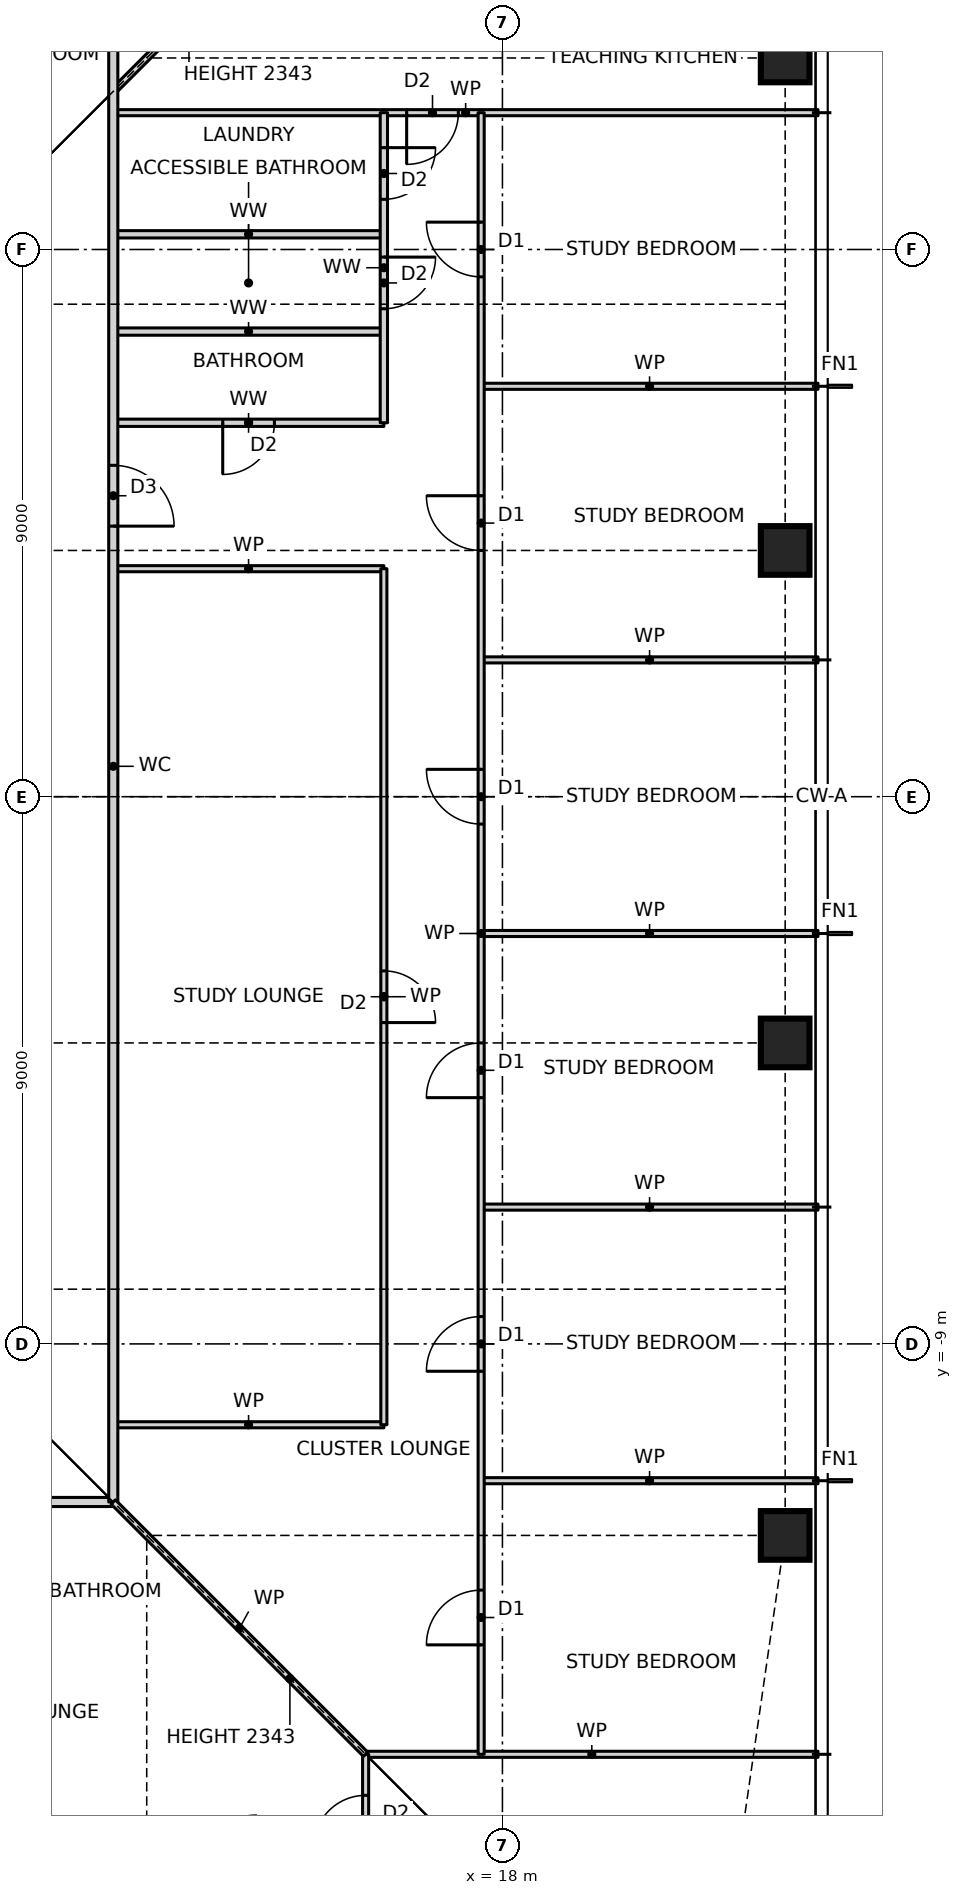
"""IFC4 building model, lengths in metres.
Left out: names, types, materials, properties, quantities, classifications, styles, units other than length and angle.
Written with IfcOpenShell. Run it as: python <this file> out.ifc"""

import sys

from ifc_helpers import new_model, si_unit, direction, frame, frame_2d, origin, origin_2d, place, context, subcontext, project, spatial, rectangle, hollow_rectangle, extrude, element, fill, save


model = new_model("IFC4")
c1 = context("Model", 3, precision=1e-05, world=origin(), true_north=direction((0.0, 1.0)))
c2 = subcontext(c1, "Body", "Model", "MODEL_VIEW")
j1 = project(units=[si_unit("LENGTHUNIT", "METRE"), si_unit("PLANEANGLEUNIT", "RADIAN")], contexts=[c1])
p1 = place(None, origin())
s1 = spatial("IfcSite", under=j1, at=p1, CompositionType="ELEMENT")
p2 = place(p1, origin())
s2 = spatial("IfcBuilding", under=s1, at=p2, CompositionType="ELEMENT")
p3 = place(p2, frame((0.0, 0.0, 60.5)))
s3 = spatial("IfcBuildingStorey", under=s2, at=p3, CompositionType="ELEMENT", Elevation=60.5)
for number, where, z_axis, x_axis in (
    (1, (22.65, -12.15, 0.0), (0.0, 0.0, 1.0), (1.0, 0.0, 0.0)),
    (2, (22.65, -4.05, 0.0), (0.0, 0.0, 1.0), (1.0, 0.0, 0.0)),
    (3, (22.65, 4.05, 0.0), (0.0, 0.0, 1.0), (1.0, 0.0, 0.0)),
    (4, (22.65, 12.15, 0.0), (0.0, 0.0, 1.0), (1.0, 0.0, 0.0)),
):
    element("IfcColumn", number, at=place(p3, frame(where, z_axis=z_axis, x_axis=x_axis)), inside=s3, PredefinedType="COLUMN", context=c2, shape_type="SweptSolid", body=[
        extrude(hollow_rectangle(XDim=0.8, YDim=0.8, WallThickness=0.09, at=origin_2d()), origin(), (0.0, 0.0, 1.0), 3.5),
    ])
p4 = place(p3, frame((15.75, -15.75, 0.0), z_axis=(0.0, 0.0, 1.0), x_axis=(1.0, 0.0, 0.0)))
e5 = element("IfcWall", 5, at=p4, inside=s3, PredefinedType="PARTITIONING", context=c2, shape_type="SweptSolid", body=[
    extrude(rectangle(XDim=7.44, YDim=0.1, at=frame_2d((3.72, 0.0))), origin(), (0.0, 0.0, 1.0), 3.27),
])
p5 = place(p3, frame((-11.6, -11.6, 0.0), z_axis=(0.0, 0.0, 1.0), x_axis=(1.0, 0.0, 0.0)))
e6 = element("IfcWall", 6, at=p5, inside=s3, PredefinedType="PARTITIONING", context=c2, shape_type="SweptSolid", body=[
    extrude(rectangle(XDim=23.2, YDim=0.15, at=frame_2d((11.6, 0.0))), origin(), (0.0, 0.0, 1.0), 3.27),
])
p6 = place(p5, frame((2.655, 0.0, 0.0)))
e7 = element("IfcOpeningElement", 7, at=p6, cuts=e6, PredefinedType="OPENING", context=c2, shape_type="SweptSolid", body=[
    extrude(rectangle(XDim=1.0, YDim=2.1, at=frame_2d((0.5, 1.05))), frame((0.0, 0.085, 0.0), z_axis=(0.0, -1.0, 0.0), x_axis=(1.0, 0.0, 0.0)), (0.0, 0.0, 1.0), 0.17),
])
p7 = place(p5, frame((12.5, 0.0, 0.0)))
e8 = element("IfcOpeningElement", 8, at=p7, cuts=e6, PredefinedType="OPENING", context=c2, shape_type="SweptSolid", body=[
    extrude(rectangle(XDim=0.9, YDim=2.1, at=frame_2d((0.45, 1.05))), frame((0.0, 0.085, 0.0), z_axis=(0.0, -1.0, 0.0), x_axis=(1.0, 0.0, 0.0)), (0.0, 0.0, 1.0), 0.17),
])
p8 = place(p5, frame((21.025, 0.0, 0.0)))
e9 = element("IfcOpeningElement", 9, at=p8, cuts=e6, PredefinedType="OPENING", context=c2, shape_type="SweptSolid", body=[
    extrude(rectangle(XDim=1.0, YDim=2.1, at=frame_2d((0.5, 1.05))), frame((0.0, 0.085, 0.0), z_axis=(0.0, -1.0, 0.0), x_axis=(1.0, 0.0, 0.0)), (0.0, 0.0, 1.0), 0.17),
])
p9 = place(p3, frame((17.65, -11.25, 0.0), z_axis=(0.0, 0.0, 1.0), x_axis=(1.0, 0.0, 0.0)))
e10 = element("IfcWall", 10, at=p9, inside=s3, PredefinedType="PARTITIONING", context=c2, shape_type="SweptSolid", body=[
    extrude(rectangle(XDim=5.54, YDim=0.1, at=frame_2d((2.77, 0.0))), origin(), (0.0, 0.0, 1.0), 3.27),
])
p10 = place(p3, frame((11.6, -10.33, 0.0), z_axis=(0.0, 0.0, 1.0), x_axis=(1.0, 0.0, 0.0)))
e11 = element("IfcWall", 11, at=p10, inside=s3, PredefinedType="PARTITIONING", context=c2, shape_type="SweptSolid", body=[
    extrude(rectangle(XDim=4.45, YDim=0.1, at=frame_2d((2.225, 0.0))), origin(), (0.0, 0.0, 1.0), 3.27),
])
for number, where, z_axis, x_axis in (
    (12, (17.65, -6.75, 0.0), (0.0, 0.0, 1.0), (1.0, 0.0, 0.0)),
    (13, (17.65, -2.25, 0.0), (0.0, 0.0, 1.0), (1.0, 0.0, 0.0)),
    (14, (17.65, 2.25, 0.0), (0.0, 0.0, 1.0), (1.0, 0.0, 0.0)),
):
    element("IfcWall", number, at=place(p3, frame(where, z_axis=z_axis, x_axis=x_axis)), inside=s3, PredefinedType="PARTITIONING", context=c2, shape_type="SweptSolid", body=[
        extrude(rectangle(XDim=5.54, YDim=0.1, at=frame_2d((2.77, 0.0))), origin(), (0.0, 0.0, 1.0), 3.27),
    ])
p11 = place(p3, frame((11.6, 3.75, 0.0), z_axis=(0.0, 0.0, 1.0), x_axis=(1.0, 0.0, 0.0)))
e15 = element("IfcWall", 15, at=p11, inside=s3, PredefinedType="PARTITIONING", context=c2, shape_type="SweptSolid", body=[
    extrude(rectangle(XDim=4.45, YDim=0.1, at=frame_2d((2.225, 0.0))), origin(), (0.0, 0.0, 1.0), 3.27),
])
p12 = place(p3, frame((11.6, 6.15, 0.0), z_axis=(0.0, 0.0, 1.0), x_axis=(1.0, 0.0, 0.0)))
e16 = element("IfcWall", 16, at=p12, inside=s3, PredefinedType="PARTITIONING", context=c2, shape_type="SweptSolid", body=[
    extrude(rectangle(XDim=4.45, YDim=0.12, at=frame_2d((2.225, 0.0))), origin(), (0.0, 0.0, 1.0), 3.27),
])
p13 = place(p12, frame((1.8, 0.0, 0.0)))
e17 = element("IfcOpeningElement", 17, at=p13, cuts=e16, PredefinedType="OPENING", context=c2, shape_type="SweptSolid", body=[
    extrude(rectangle(XDim=0.85, YDim=2.1, at=frame_2d((0.425, 1.05))), frame((0.0, 0.07, 0.0), z_axis=(0.0, -1.0, 0.0), x_axis=(1.0, 0.0, 0.0)), (0.0, 0.0, 1.0), 0.14),
])
p14 = place(p3, frame((17.65, 6.75, 0.0), z_axis=(0.0, 0.0, 1.0), x_axis=(1.0, 0.0, 0.0)))
e18 = element("IfcWall", 18, at=p14, inside=s3, PredefinedType="PARTITIONING", context=c2, shape_type="SweptSolid", body=[
    extrude(rectangle(XDim=5.54, YDim=0.1, at=frame_2d((2.77, 0.0))), origin(), (0.0, 0.0, 1.0), 3.27),
])
for number, where, z_axis, x_axis in (
    (19, (11.6, 7.65, 0.0), (0.0, 0.0, 1.0), (1.0, 0.0, 0.0)),
    (20, (11.6, 9.25, 0.0), (0.0, 0.0, 1.0), (1.0, 0.0, 0.0)),
):
    element("IfcWall", number, at=place(p3, frame(where, z_axis=z_axis, x_axis=x_axis)), inside=s3, PredefinedType="PARTITIONING", context=c2, shape_type="SweptSolid", body=[
        extrude(rectangle(XDim=4.45, YDim=0.12, at=frame_2d((2.225, 0.0))), origin(), (0.0, 0.0, 1.0), 3.27),
    ])
p15 = place(p3, frame((11.6, 11.25, 0.0), z_axis=(0.0, 0.0, 1.0), x_axis=(1.0, 0.0, 0.0)))
e21 = element("IfcWall", 21, at=p15, inside=s3, PredefinedType="PARTITIONING", context=c2, shape_type="SweptSolid", body=[
    extrude(rectangle(XDim=11.59, YDim=0.1, at=frame_2d((5.795, 0.0))), origin(), (0.0, 0.0, 1.0), 3.27),
])
p16 = place(p15, frame((4.825, 0.0, 0.0)))
e22 = element("IfcOpeningElement", 22, at=p16, cuts=e21, PredefinedType="OPENING", context=c2, shape_type="SweptSolid", body=[
    extrude(rectangle(XDim=0.85, YDim=2.1, at=frame_2d((0.425, 1.05))), frame((0.0, 0.06, 0.0), z_axis=(0.0, -1.0, 0.0), x_axis=(1.0, 0.0, 0.0)), (0.0, 0.0, 1.0), 0.12),
])
p17 = place(p3, frame((11.6, 11.6, 0.0), z_axis=(0.0, 0.0, 1.0), x_axis=(0.707106781187, 0.707106781187, 0.0)))
e23 = element("IfcWall", 23, at=p17, inside=s3, PredefinedType="PARTITIONING", context=c2, shape_type="SweptSolid", body=[
    extrude(rectangle(XDim=5.869, YDim=0.1, at=frame_2d((2.935, 0.0))), origin(), (0.0, 0.0, 1.0), 2.343),
])
p18 = place(p3, frame((17.65, -15.75, 0.0), z_axis=(0.0, 0.0, 1.0), x_axis=(0.0, 1.0, 0.0)))
e24 = element("IfcWall", 24, at=p18, inside=s3, PredefinedType="PARTITIONING", context=c2, shape_type="SweptSolid", body=[
    extrude(rectangle(XDim=27.0, YDim=0.1, at=frame_2d((13.5, 0.0))), origin(), (0.0, 0.0, 1.0), 3.27),
])
p19 = place(p18, frame((1.8, 0.0, 0.0)))
e25 = element("IfcOpeningElement", 25, at=p19, cuts=e24, PredefinedType="OPENING", context=c2, shape_type="SweptSolid", body=[
    extrude(rectangle(XDim=0.9, YDim=2.1, at=frame_2d((0.45, 1.05))), frame((0.0, 0.06, 0.0), z_axis=(0.0, -1.0, 0.0), x_axis=(1.0, 0.0, 0.0)), (0.0, 0.0, 1.0), 0.12),
])
p20 = place(p18, frame((6.3, 0.0, 0.0)))
e26 = element("IfcOpeningElement", 26, at=p20, cuts=e24, PredefinedType="OPENING", context=c2, shape_type="SweptSolid", body=[
    extrude(rectangle(XDim=0.9, YDim=2.1, at=frame_2d((0.45, 1.05))), frame((0.0, 0.06, 0.0), z_axis=(0.0, -1.0, 0.0), x_axis=(1.0, 0.0, 0.0)), (0.0, 0.0, 1.0), 0.12),
])
p21 = place(p18, frame((10.8, 0.0, 0.0)))
e27 = element("IfcOpeningElement", 27, at=p21, cuts=e24, PredefinedType="OPENING", context=c2, shape_type="SweptSolid", body=[
    extrude(rectangle(XDim=0.9, YDim=2.1, at=frame_2d((0.45, 1.05))), frame((0.0, 0.06, 0.0), z_axis=(0.0, -1.0, 0.0), x_axis=(1.0, 0.0, 0.0)), (0.0, 0.0, 1.0), 0.12),
])
p22 = place(p18, frame((15.3, 0.0, 0.0)))
e28 = element("IfcOpeningElement", 28, at=p22, cuts=e24, PredefinedType="OPENING", context=c2, shape_type="SweptSolid", body=[
    extrude(rectangle(XDim=0.9, YDim=2.1, at=frame_2d((0.45, 1.05))), frame((0.0, 0.06, 0.0), z_axis=(0.0, -1.0, 0.0), x_axis=(1.0, 0.0, 0.0)), (0.0, 0.0, 1.0), 0.12),
])
p23 = place(p18, frame((19.8, 0.0, 0.0)))
e29 = element("IfcOpeningElement", 29, at=p23, cuts=e24, PredefinedType="OPENING", context=c2, shape_type="SweptSolid", body=[
    extrude(rectangle(XDim=0.9, YDim=2.1, at=frame_2d((0.45, 1.05))), frame((0.0, 0.06, 0.0), z_axis=(0.0, -1.0, 0.0), x_axis=(1.0, 0.0, 0.0)), (0.0, 0.0, 1.0), 0.12),
])
p24 = place(p18, frame((24.3, 0.0, 0.0)))
e30 = element("IfcOpeningElement", 30, at=p24, cuts=e24, PredefinedType="OPENING", context=c2, shape_type="SweptSolid", body=[
    extrude(rectangle(XDim=0.9, YDim=2.1, at=frame_2d((0.45, 1.05))), frame((0.0, 0.06, 0.0), z_axis=(0.0, -1.0, 0.0), x_axis=(1.0, 0.0, 0.0)), (0.0, 0.0, 1.0), 0.12),
])
p25 = place(p3, frame((16.05, -10.33, 0.0), z_axis=(0.0, 0.0, 1.0), x_axis=(0.0, 1.0, 0.0)))
e31 = element("IfcWall", 31, at=p25, inside=s3, PredefinedType="PARTITIONING", context=c2, shape_type="SweptSolid", body=[
    extrude(rectangle(XDim=14.08, YDim=0.1, at=frame_2d((7.04, 0.0))), origin(), (0.0, 0.0, 1.0), 3.27),
])
p26 = place(p25, frame((6.615, 0.0, 0.0)))
e32 = element("IfcOpeningElement", 32, at=p26, cuts=e31, PredefinedType="OPENING", context=c2, shape_type="SweptSolid", body=[
    extrude(rectangle(XDim=0.85, YDim=2.1, at=frame_2d((0.425, 1.05))), frame((0.0, 0.06, 0.0), z_axis=(0.0, -1.0, 0.0), x_axis=(1.0, 0.0, 0.0)), (0.0, 0.0, 1.0), 0.12),
])
p27 = place(p3, frame((16.05, 6.15, 0.0), z_axis=(0.0, 0.0, 1.0), x_axis=(0.0, 1.0, 0.0)))
e33 = element("IfcWall", 33, at=p27, inside=s3, PredefinedType="PARTITIONING", context=c2, shape_type="SweptSolid", body=[
    extrude(rectangle(XDim=5.1, YDim=0.12, at=frame_2d((2.55, 0.0))), origin(), (0.0, 0.0, 1.0), 3.27),
])
p28 = place(p27, frame((1.875, 0.0, 0.0)))
e34 = element("IfcOpeningElement", 34, at=p28, cuts=e33, PredefinedType="OPENING", context=c2, shape_type="SweptSolid", body=[
    extrude(rectangle(XDim=0.85, YDim=2.1, at=frame_2d((0.425, 1.05))), frame((0.0, 0.07, 0.0), z_axis=(0.0, -1.0, 0.0), x_axis=(1.0, 0.0, 0.0)), (0.0, 0.0, 1.0), 0.14),
])
p29 = place(p27, frame((3.675, 0.0, 0.0)))
e35 = element("IfcOpeningElement", 35, at=p29, cuts=e33, PredefinedType="OPENING", context=c2, shape_type="SweptSolid", body=[
    extrude(rectangle(XDim=0.85, YDim=2.1, at=frame_2d((0.425, 1.05))), frame((0.0, 0.07, 0.0), z_axis=(0.0, -1.0, 0.0), x_axis=(1.0, 0.0, 0.0)), (0.0, 0.0, 1.0), 0.14),
])
p30 = place(p3, frame((15.75, -23.19, 0.0), z_axis=(0.0, 0.0, 1.0), x_axis=(0.0, 1.0, 0.0)))
e36 = element("IfcWall", 36, at=p30, inside=s3, PredefinedType="PARTITIONING", context=c2, shape_type="SweptSolid", body=[
    extrude(rectangle(XDim=7.44, YDim=0.1, at=frame_2d((3.72, 0.0))), origin(), (0.0, 0.0, 1.0), 3.27),
])
p31 = place(p30, frame((5.915, 0.0, 0.0)))
e37 = element("IfcOpeningElement", 37, at=p31, cuts=e36, PredefinedType="OPENING", context=c2, shape_type="SweptSolid", body=[
    extrude(rectangle(XDim=0.85, YDim=2.1, at=frame_2d((0.425, 1.05))), frame((0.0, 0.06, 0.0), z_axis=(0.0, -1.0, 0.0), x_axis=(1.0, 0.0, 0.0)), (0.0, 0.0, 1.0), 0.12),
])
p32 = place(p3, frame((11.6, -11.6, 0.0), z_axis=(0.0, 0.0, 1.0), x_axis=(0.0, 1.0, 0.0)))
e38 = element("IfcWall", 38, at=p32, inside=s3, PredefinedType="PARTITIONING", context=c2, shape_type="SweptSolid", body=[
    extrude(rectangle(XDim=24.2, YDim=0.15, at=frame_2d((12.1, 0.0))), origin(), (0.0, 0.0, 1.0), 3.27),
])
p33 = place(p32, frame((16.05, 0.0, 0.0)))
e39 = element("IfcOpeningElement", 39, at=p33, cuts=e38, PredefinedType="OPENING", context=c2, shape_type="SweptSolid", body=[
    extrude(rectangle(XDim=1.0, YDim=2.1, at=frame_2d((0.5, 1.05))), frame((0.0, 0.085, 0.0), z_axis=(0.0, -1.0, 0.0), x_axis=(1.0, 0.0, 0.0)), (0.0, 0.0, 1.0), 0.17),
])
p34 = place(p3, frame((15.75, -15.75, 0.0), z_axis=(0.0, 0.0, 1.0), x_axis=(-0.707106781187, 0.707106781187, 0.0)))
e40 = element("IfcWall", 40, at=p34, inside=s3, PredefinedType="PARTITIONING", context=c2, shape_type="SweptSolid", body=[
    extrude(rectangle(XDim=5.869, YDim=0.1, at=frame_2d((2.935, 0.0))), origin(), (0.0, 0.0, 1.0), 2.343),
])
p35 = place(p19, origin())
e41 = element("IfcDoor", 41, at=p35, inside=s3, OperationType="SINGLE_SWING_LEFT", PredefinedType="DOOR", context=c2, shape_type="SweptSolid", body=[
    extrude(rectangle(XDim=0.9, YDim=2.1, at=frame_2d((0.45, 1.05))), frame((0.0, 0.025, 0.0), z_axis=(0.0, -1.0, 0.0), x_axis=(1.0, 0.0, 0.0)), (0.0, 0.0, 1.0), 0.05),
])
fill(e25, e41)
p36 = place(p20, origin())
e42 = element("IfcDoor", 42, at=p36, inside=s3, OperationType="SINGLE_SWING_LEFT", PredefinedType="DOOR", context=c2, shape_type="SweptSolid", body=[
    extrude(rectangle(XDim=0.9, YDim=2.1, at=frame_2d((0.45, 1.05))), frame((0.0, 0.025, 0.0), z_axis=(0.0, -1.0, 0.0), x_axis=(1.0, 0.0, 0.0)), (0.0, 0.0, 1.0), 0.05),
])
fill(e26, e42)
p37 = place(p21, origin())
e43 = element("IfcDoor", 43, at=p37, inside=s3, OperationType="SINGLE_SWING_LEFT", PredefinedType="DOOR", context=c2, shape_type="SweptSolid", body=[
    extrude(rectangle(XDim=0.9, YDim=2.1, at=frame_2d((0.45, 1.05))), frame((0.0, 0.025, 0.0), z_axis=(0.0, -1.0, 0.0), x_axis=(1.0, 0.0, 0.0)), (0.0, 0.0, 1.0), 0.05),
])
fill(e27, e43)
p38 = place(p22, origin())
e44 = element("IfcDoor", 44, at=p38, inside=s3, OperationType="SINGLE_SWING_RIGHT", PredefinedType="DOOR", context=c2, shape_type="SweptSolid", body=[
    extrude(rectangle(XDim=0.9, YDim=2.1, at=frame_2d((0.45, 1.05))), frame((0.0, 0.025, 0.0), z_axis=(0.0, -1.0, 0.0), x_axis=(1.0, 0.0, 0.0)), (0.0, 0.0, 1.0), 0.05),
])
fill(e28, e44)
p39 = place(p23, origin())
e45 = element("IfcDoor", 45, at=p39, inside=s3, OperationType="SINGLE_SWING_RIGHT", PredefinedType="DOOR", context=c2, shape_type="SweptSolid", body=[
    extrude(rectangle(XDim=0.9, YDim=2.1, at=frame_2d((0.45, 1.05))), frame((0.0, 0.025, 0.0), z_axis=(0.0, -1.0, 0.0), x_axis=(1.0, 0.0, 0.0)), (0.0, 0.0, 1.0), 0.05),
])
fill(e29, e45)
p40 = place(p24, origin())
e46 = element("IfcDoor", 46, at=p40, inside=s3, OperationType="SINGLE_SWING_RIGHT", PredefinedType="DOOR", context=c2, shape_type="SweptSolid", body=[
    extrude(rectangle(XDim=0.9, YDim=2.1, at=frame_2d((0.45, 1.05))), frame((0.0, 0.025, 0.0), z_axis=(0.0, -1.0, 0.0), x_axis=(1.0, 0.0, 0.0)), (0.0, 0.0, 1.0), 0.05),
])
fill(e30, e46)
p41 = place(p33, frame((1.0, 0.0, 0.0), z_axis=(0.0, 0.0, 1.0), x_axis=(-1.0, 0.0, 0.0)))
e47 = element("IfcDoor", 47, at=p41, inside=s3, OperationType="SINGLE_SWING_RIGHT", PredefinedType="DOOR", context=c2, shape_type="SweptSolid", body=[
    extrude(rectangle(XDim=1.0, YDim=2.1, at=frame_2d((0.5, 1.05))), frame((0.0, 0.025, 0.0), z_axis=(0.0, -1.0, 0.0), x_axis=(1.0, 0.0, 0.0)), (0.0, 0.0, 1.0), 0.05),
])
fill(e39, e47)
p42 = place(p26, frame((0.85, 0.0, 0.0), z_axis=(0.0, 0.0, 1.0), x_axis=(-1.0, 0.0, 0.0)))
e48 = element("IfcDoor", 48, at=p42, inside=s3, OperationType="SINGLE_SWING_RIGHT", PredefinedType="DOOR", context=c2, shape_type="SweptSolid", body=[
    extrude(rectangle(XDim=0.85, YDim=2.1, at=frame_2d((0.425, 1.05))), frame((0.0, 0.025, 0.0), z_axis=(0.0, -1.0, 0.0), x_axis=(1.0, 0.0, 0.0)), (0.0, 0.0, 1.0), 0.05),
])
fill(e32, e48)
p43 = place(p13, frame((0.85, 0.0, 0.0), z_axis=(0.0, 0.0, 1.0), x_axis=(-1.0, 0.0, 0.0)))
e49 = element("IfcDoor", 49, at=p43, inside=s3, OperationType="SINGLE_SWING_RIGHT", PredefinedType="DOOR", context=c2, shape_type="SweptSolid", body=[
    extrude(rectangle(XDim=0.85, YDim=2.1, at=frame_2d((0.425, 1.05))), frame((0.0, 0.025, 0.0), z_axis=(0.0, -1.0, 0.0), x_axis=(1.0, 0.0, 0.0)), (0.0, 0.0, 1.0), 0.05),
])
fill(e17, e49)
p44 = place(p28, frame((0.85, 0.0, 0.0), z_axis=(0.0, 0.0, 1.0), x_axis=(-1.0, 0.0, 0.0)))
e50 = element("IfcDoor", 50, at=p44, inside=s3, OperationType="SINGLE_SWING_LEFT", PredefinedType="DOOR", context=c2, shape_type="SweptSolid", body=[
    extrude(rectangle(XDim=0.85, YDim=2.1, at=frame_2d((0.425, 1.05))), frame((0.0, 0.025, 0.0), z_axis=(0.0, -1.0, 0.0), x_axis=(1.0, 0.0, 0.0)), (0.0, 0.0, 1.0), 0.05),
])
fill(e34, e50)
p45 = place(p29, frame((0.85, 0.0, 0.0), z_axis=(0.0, 0.0, 1.0), x_axis=(-1.0, 0.0, 0.0)))
e51 = element("IfcDoor", 51, at=p45, inside=s3, OperationType="SINGLE_SWING_LEFT", PredefinedType="DOOR", context=c2, shape_type="SweptSolid", body=[
    extrude(rectangle(XDim=0.85, YDim=2.1, at=frame_2d((0.425, 1.05))), frame((0.0, 0.025, 0.0), z_axis=(0.0, -1.0, 0.0), x_axis=(1.0, 0.0, 0.0)), (0.0, 0.0, 1.0), 0.05),
])
fill(e35, e51)
p46 = place(p16, frame((0.85, 0.0, 0.0), z_axis=(0.0, 0.0, 1.0), x_axis=(-1.0, 0.0, 0.0)))
e52 = element("IfcDoor", 52, at=p46, inside=s3, OperationType="SINGLE_SWING_RIGHT", PredefinedType="DOOR", context=c2, shape_type="SweptSolid", body=[
    extrude(rectangle(XDim=0.85, YDim=2.1, at=frame_2d((0.425, 1.05))), frame((0.0, 0.025, 0.0), z_axis=(0.0, -1.0, 0.0), x_axis=(1.0, 0.0, 0.0)), (0.0, 0.0, 1.0), 0.05),
])
fill(e22, e52)
p47 = place(p31, origin())
e53 = element("IfcDoor", 53, at=p47, inside=s3, OperationType="SINGLE_SWING_LEFT", PredefinedType="DOOR", context=c2, shape_type="SweptSolid", body=[
    extrude(rectangle(XDim=0.85, YDim=2.1, at=frame_2d((0.425, 1.05))), frame((0.0, 0.025, 0.0), z_axis=(0.0, -1.0, 0.0), x_axis=(1.0, 0.0, 0.0)), (0.0, 0.0, 1.0), 0.05),
])
fill(e37, e53)
save(model, sys.argv[1])
